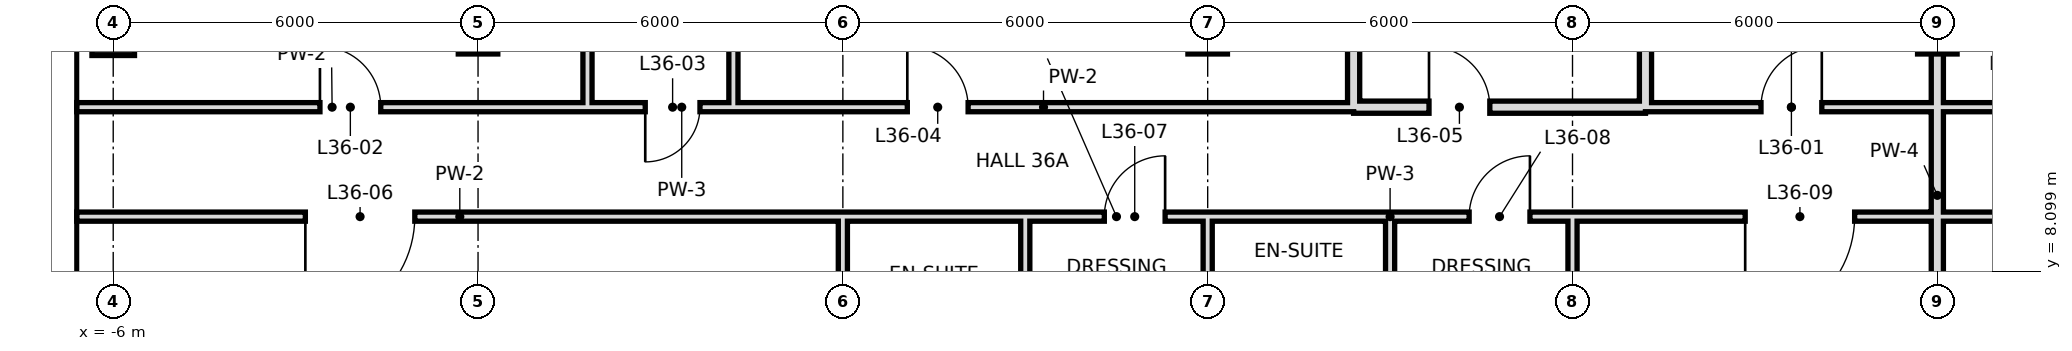
"""IFC4 building model, lengths in metres.
Left out: names, types, materials, properties, quantities, classifications, styles, units other than length and angle.
Written with IfcOpenShell. Run it as: python <this file> out.ifc"""

import sys

from ifc_helpers import new_model, si_unit, direction, frame, frame_2d, origin, origin_2d, place, context, subcontext, project, spatial, rectangle, hollow_rectangle, extrude, element, fill, save


model = new_model("IFC4")
c1 = context("Model", 3, precision=1e-05, world=origin(), true_north=direction((0.0, 1.0)))
c2 = subcontext(c1, "Body", "Model", "MODEL_VIEW")
j1 = project(units=[si_unit("LENGTHUNIT", "METRE"), si_unit("PLANEANGLEUNIT", "RADIAN")], contexts=[c1])
p1 = place(None, origin())
s1 = spatial("IfcSite", under=j1, at=p1, CompositionType="ELEMENT")
p2 = place(p1, origin())
s2 = spatial("IfcBuilding", under=s1, at=p2, CompositionType="ELEMENT")
p3 = place(p2, frame((0.0, 0.0, 158.2)))
s3 = spatial("IfcBuildingStorey", under=s2, at=p3, CompositionType="ELEMENT", Elevation=158.2)
p4 = place(p3, frame((-6.0, 12.0, 0.0), z_axis=(0.0, 0.0, 1.0), x_axis=(1.0, 0.0, 0.0)))
e1 = element("IfcColumn", 1, at=p4, inside=s3, PredefinedType="COLUMN", context=c2, shape_type="SweptSolid", body=[
    extrude(hollow_rectangle(XDim=0.7, YDim=0.7, WallThickness=0.036, at=origin_2d()), origin(), (0.0, 0.0, 1.0), 3.6),
])
for number, where, z_axis, x_axis in (
    (2, (0.0, 12.0, 0.0), (0.0, 0.0, 1.0), (1.0, 0.0, 0.0)),
    (3, (12.0, 12.0, 0.0), (0.0, 0.0, 1.0), (1.0, 0.0, 0.0)),
    (4, (24.0, 12.0, 0.0), (0.0, 0.0, 1.0), (1.0, 0.0, 0.0)),
):
    element("IfcColumn", number, at=place(p3, frame(where, z_axis=z_axis, x_axis=x_axis)), inside=s3, PredefinedType="COLUMN", context=c2, shape_type="SweptSolid", body=[
        extrude(hollow_rectangle(XDim=0.65, YDim=0.65, WallThickness=0.032, at=origin_2d()), origin(), (0.0, 0.0, 1.0), 3.6),
    ])
p5 = place(p3, frame((1.8, 10.8, 0.0), z_axis=(0.0, 0.0, 1.0), x_axis=(0.0, 1.0, 0.0)))
e5 = element("IfcWall", 5, at=p5, inside=s3, PredefinedType="PARTITIONING", context=c2, shape_type="SweptSolid", body=[
    extrude(rectangle(XDim=7.2, YDim=0.15, at=frame_2d((3.6, 0.0))), origin(), (0.0, 0.0, 1.0), 3.38),
])
p6 = place(p3, frame((12.0, 6.0, 0.0), z_axis=(0.0, 0.0, 1.0), x_axis=(0.0, 1.0, 0.0)))
e6 = element("IfcWall", 6, at=p6, inside=s3, PredefinedType="PARTITIONING", context=c2, shape_type="SweptSolid", body=[
    extrude(rectangle(XDim=3.0, YDim=0.15, at=frame_2d((1.5, 0.0))), origin(), (0.0, 0.0, 1.0), 2.68),
])
p7 = place(p3, frame((14.4, 10.8, 0.0), z_axis=(0.0, 0.0, 1.0), x_axis=(0.0, 1.0, 0.0)))
e7 = element("IfcWall", 7, at=p7, inside=s3, PredefinedType="SOLIDWALL", context=c2, shape_type="SweptSolid", body=[
    extrude(rectangle(XDim=7.9, YDim=0.2, at=frame_2d((3.95, 0.0))), origin(), (0.0, 0.0, 1.0), 2.68),
])
p8 = place(p3, frame((15.0, 6.0, 0.0), z_axis=(0.0, 0.0, 1.0), x_axis=(0.0, 1.0, 0.0)))
e8 = element("IfcWall", 8, at=p8, inside=s3, PredefinedType="PARTITIONING", context=c2, shape_type="SweptSolid", body=[
    extrude(rectangle(XDim=3.0, YDim=0.15, at=frame_2d((1.5, 0.0))), origin(), (0.0, 0.0, 1.0), 3.38),
])
p9 = place(p3, frame((18.0, -0.6, 0.0), z_axis=(0.0, 0.0, 1.0), x_axis=(0.0, 1.0, 0.0)))
e9 = element("IfcWall", 9, at=p9, inside=s3, PredefinedType="PARTITIONING", context=c2, shape_type="SweptSolid", body=[
    extrude(rectangle(XDim=9.6, YDim=0.15, at=frame_2d((4.8, 0.0))), origin(), (0.0, 0.0, 1.0), 2.68),
])
p10 = place(p3, frame((19.2, 10.8, 0.0), z_axis=(0.0, 0.0, 1.0), x_axis=(0.0, 1.0, 0.0)))
e10 = element("IfcWall", 10, at=p10, inside=s3, PredefinedType="SOLIDWALL", context=c2, shape_type="SweptSolid", body=[
    extrude(rectangle(XDim=7.9, YDim=0.2, at=frame_2d((3.95, 0.0))), origin(), (0.0, 0.0, 1.0), 2.68),
])
p11 = place(p3, frame((24.0, 0.0, 0.0), z_axis=(0.0, 0.0, 1.0), x_axis=(0.0, 1.0, 0.0)))
e11 = element("IfcWall", 11, at=p11, inside=s3, PredefinedType="SOLIDWALL", context=c2, shape_type="SweptSolid", body=[
    extrude(rectangle(XDim=18.7, YDim=0.2, at=frame_2d((9.35, 0.0))), origin(), (0.0, 0.0, 1.0), 2.68),
])
p12 = place(p3, frame((4.2, 10.8, 0.0), z_axis=(0.0, 0.0, 1.0), x_axis=(0.0, 1.0, 0.0)))
e12 = element("IfcWall", 12, at=p12, inside=s3, PredefinedType="PARTITIONING", context=c2, shape_type="SweptSolid", body=[
    extrude(rectangle(XDim=7.9, YDim=0.15, at=frame_2d((3.95, 0.0))), origin(), (0.0, 0.0, 1.0), 3.38),
])
p13 = place(p3, frame((6.0, 6.0, 0.0), z_axis=(0.0, 0.0, 1.0), x_axis=(0.0, 1.0, 0.0)))
e13 = element("IfcWall", 13, at=p13, inside=s3, PredefinedType="PARTITIONING", context=c2, shape_type="SweptSolid", body=[
    extrude(rectangle(XDim=3.0, YDim=0.15, at=frame_2d((1.5, 0.0))), origin(), (0.0, 0.0, 1.0), 2.68),
])
p14 = place(p3, frame((9.0, 6.0, 0.0), z_axis=(0.0, 0.0, 1.0), x_axis=(0.0, 1.0, 0.0)))
e14 = element("IfcWall", 14, at=p14, inside=s3, PredefinedType="PARTITIONING", context=c2, shape_type="SweptSolid", body=[
    extrude(rectangle(XDim=3.0, YDim=0.15, at=frame_2d((1.5, 0.0))), origin(), (0.0, 0.0, 1.0), 3.38),
])
p15 = place(p3, frame((14.4, 10.8, 0.0), z_axis=(0.0, 0.0, 1.0), x_axis=(1.0, 0.0, 0.0)))
e15 = element("IfcWall", 15, at=p15, inside=s3, PredefinedType="SOLIDWALL", context=c2, shape_type="SweptSolid", body=[
    extrude(rectangle(XDim=4.8, YDim=0.2, at=frame_2d((2.4, 0.0))), origin(), (0.0, 0.0, 1.0), 2.68),
])
p16 = place(p15, frame((1.24, 0.0, 0.0)))
e16 = element("IfcOpeningElement", 16, at=p16, cuts=e15, PredefinedType="OPENING", context=c2, shape_type="SweptSolid", body=[
    extrude(rectangle(XDim=1.0, YDim=2.4, at=frame_2d((0.5, 1.2))), frame((0.0, 0.11, 0.0), z_axis=(0.0, -1.0, 0.0), x_axis=(1.0, 0.0, 0.0)), (0.0, 0.0, 1.0), 0.22),
])
p17 = place(p3, frame((-6.6, 10.8, 0.0), z_axis=(0.0, 0.0, 1.0), x_axis=(1.0, 0.0, 0.0)))
e17 = element("IfcWall", 17, at=p17, inside=s3, PredefinedType="PARTITIONING", context=c2, shape_type="SweptSolid", body=[
    extrude(rectangle(XDim=8.4, YDim=0.15, at=frame_2d((4.2, 0.0))), origin(), (0.0, 0.0, 1.0), 3.38),
])
p18 = place(p17, frame((4.0, 0.0, 0.0)))
e18 = element("IfcOpeningElement", 18, at=p18, cuts=e17, PredefinedType="OPENING", context=c2, shape_type="SweptSolid", body=[
    extrude(rectangle(XDim=1.0, YDim=2.4, at=frame_2d((0.5, 1.2))), frame((0.0, 0.085, 0.0), z_axis=(0.0, -1.0, 0.0), x_axis=(1.0, 0.0, 0.0)), (0.0, 0.0, 1.0), 0.17),
])
p19 = place(p3, frame((4.2, 10.8, 0.0), z_axis=(0.0, 0.0, 1.0), x_axis=(1.0, 0.0, 0.0)))
e19 = element("IfcWall", 19, at=p19, inside=s3, PredefinedType="PARTITIONING", context=c2, shape_type="SweptSolid", body=[
    extrude(rectangle(XDim=10.2, YDim=0.15, at=frame_2d((5.1, 0.0))), origin(), (0.0, 0.0, 1.0), 3.38),
])
p20 = place(p19, frame((2.86, 0.0, 0.0)))
e20 = element("IfcOpeningElement", 20, at=p20, cuts=e19, PredefinedType="OPENING", context=c2, shape_type="SweptSolid", body=[
    extrude(rectangle(XDim=1.0, YDim=2.4, at=frame_2d((0.5, 1.2))), frame((0.0, 0.085, 0.0), z_axis=(0.0, -1.0, 0.0), x_axis=(1.0, 0.0, 0.0)), (0.0, 0.0, 1.0), 0.17),
])
p21 = place(p3, frame((19.2, 10.8, 0.0), z_axis=(0.0, 0.0, 1.0), x_axis=(1.0, 0.0, 0.0)))
e21 = element("IfcWall", 21, at=p21, inside=s3, PredefinedType="PARTITIONING", context=c2, shape_type="SweptSolid", body=[
    extrude(rectangle(XDim=4.8, YDim=0.15, at=frame_2d((2.4, 0.0))), origin(), (0.0, 0.0, 1.0), 3.38),
])
p22 = place(p21, frame((1.9, 0.0, 0.0)))
e22 = element("IfcOpeningElement", 22, at=p22, cuts=e21, PredefinedType="OPENING", context=c2, shape_type="SweptSolid", body=[
    extrude(rectangle(XDim=1.0, YDim=2.4, at=frame_2d((0.5, 1.2))), frame((0.0, 0.085, 0.0), z_axis=(0.0, -1.0, 0.0), x_axis=(1.0, 0.0, 0.0)), (0.0, 0.0, 1.0), 0.17),
])
p23 = place(p3, frame((1.8, 10.8, 0.0), z_axis=(0.0, 0.0, 1.0), x_axis=(1.0, 0.0, 0.0)))
e23 = element("IfcWall", 23, at=p23, inside=s3, PredefinedType="PARTITIONING", context=c2, shape_type="SweptSolid", body=[
    extrude(rectangle(XDim=2.4, YDim=0.15, at=frame_2d((1.2, 0.0))), origin(), (0.0, 0.0, 1.0), 3.38),
])
p24 = place(p23, frame((0.95, 0.0, 0.0)))
e24 = element("IfcOpeningElement", 24, at=p24, cuts=e23, PredefinedType="OPENING", context=c2, shape_type="SweptSolid", body=[
    extrude(rectangle(XDim=0.9, YDim=2.4, at=frame_2d((0.45, 1.2))), frame((0.0, 0.085, 0.0), z_axis=(0.0, -1.0, 0.0), x_axis=(1.0, 0.0, 0.0)), (0.0, 0.0, 1.0), 0.17),
])
p25 = place(p3, frame((24.0, 10.8, 0.0), z_axis=(0.0, 0.0, 1.0), x_axis=(1.0, 0.0, 0.0)))
e25 = element("IfcWall", 25, at=p25, inside=s3, PredefinedType="PARTITIONING", context=c2, shape_type="SweptSolid", body=[
    extrude(rectangle(XDim=2.4, YDim=0.15, at=frame_2d((1.2, 0.0))), origin(), (0.0, 0.0, 1.0), 3.38),
])
p26 = place(p25, frame((0.95, 0.0, 0.0)))
e26 = element("IfcOpeningElement", 26, at=p26, cuts=e25, PredefinedType="OPENING", context=c2, shape_type="SweptSolid", body=[
    extrude(rectangle(XDim=0.9, YDim=2.4, at=frame_2d((0.45, 1.2))), frame((0.0, 0.085, 0.0), z_axis=(0.0, -1.0, 0.0), x_axis=(1.0, 0.0, 0.0)), (0.0, 0.0, 1.0), 0.17),
])
p27 = place(p3, frame((-6.6, 9.0, 0.0), z_axis=(0.0, 0.0, 1.0), x_axis=(1.0, 0.0, 0.0)))
e27 = element("IfcWall", 27, at=p27, inside=s3, PredefinedType="PARTITIONING", context=c2, shape_type="SweptSolid", body=[
    extrude(rectangle(XDim=12.6, YDim=0.15, at=frame_2d((6.3, 0.0))), origin(), (0.0, 0.0, 1.0), 3.38),
])
p28 = place(p27, frame((3.76, 0.0, 0.0)))
e28 = element("IfcOpeningElement", 28, at=p28, cuts=e27, PredefinedType="OPENING", context=c2, shape_type="SweptSolid", body=[
    extrude(rectangle(XDim=1.8, YDim=2.4, at=frame_2d((0.9, 1.2))), frame((0.0, 0.085, 0.0), z_axis=(0.0, -1.0, 0.0), x_axis=(1.0, 0.0, 0.0)), (0.0, 0.0, 1.0), 0.17),
])
p29 = place(p3, frame((9.0, 9.0, 0.0), z_axis=(0.0, 0.0, 1.0), x_axis=(1.0, 0.0, 0.0)))
e29 = element("IfcWall", 29, at=p29, inside=s3, PredefinedType="PARTITIONING", context=c2, shape_type="SweptSolid", body=[
    extrude(rectangle(XDim=3.0, YDim=0.15, at=frame_2d((1.5, 0.0))), origin(), (0.0, 0.0, 1.0), 3.38),
])
p30 = place(p29, frame((1.3, 0.0, 0.0)))
e30 = element("IfcOpeningElement", 30, at=p30, cuts=e29, PredefinedType="OPENING", context=c2, shape_type="SweptSolid", body=[
    extrude(rectangle(XDim=1.0, YDim=2.4, at=frame_2d((0.5, 1.2))), frame((0.0, 0.085, 0.0), z_axis=(0.0, -1.0, 0.0), x_axis=(1.0, 0.0, 0.0)), (0.0, 0.0, 1.0), 0.17),
])
p31 = place(p3, frame((15.0, 9.0, 0.0), z_axis=(0.0, 0.0, 1.0), x_axis=(1.0, 0.0, 0.0)))
e31 = element("IfcWall", 31, at=p31, inside=s3, PredefinedType="PARTITIONING", context=c2, shape_type="SweptSolid", body=[
    extrude(rectangle(XDim=24.6, YDim=0.15, at=frame_2d((12.3, 0.0))), origin(), (0.0, 0.0, 1.0), 3.38),
])
p32 = place(p31, frame((1.3, 0.0, 0.0)))
e32 = element("IfcOpeningElement", 32, at=p32, cuts=e31, PredefinedType="OPENING", context=c2, shape_type="SweptSolid", body=[
    extrude(rectangle(XDim=1.0, YDim=2.4, at=frame_2d((0.5, 1.2))), frame((0.0, 0.085, 0.0), z_axis=(0.0, -1.0, 0.0), x_axis=(1.0, 0.0, 0.0)), (0.0, 0.0, 1.0), 0.17),
])
p33 = place(p31, frame((5.84, 0.0, 0.0)))
e33 = element("IfcOpeningElement", 33, at=p33, cuts=e31, PredefinedType="OPENING", context=c2, shape_type="SweptSolid", body=[
    extrude(rectangle(XDim=1.8, YDim=2.4, at=frame_2d((0.9, 1.2))), frame((0.0, 0.085, 0.0), z_axis=(0.0, -1.0, 0.0), x_axis=(1.0, 0.0, 0.0)), (0.0, 0.0, 1.0), 0.17),
])
p34 = place(p31, frame((10.6, 0.0, 0.0)))
e34 = element("IfcOpeningElement", 34, at=p34, cuts=e31, PredefinedType="OPENING", context=c2, shape_type="SweptSolid", body=[
    extrude(rectangle(XDim=1.0, YDim=2.4, at=frame_2d((0.5, 1.2))), frame((0.0, 0.085, 0.0), z_axis=(0.0, -1.0, 0.0), x_axis=(1.0, 0.0, 0.0)), (0.0, 0.0, 1.0), 0.17),
])
p35 = place(p31, frame((16.6, 0.0, 0.0)))
e35 = element("IfcOpeningElement", 35, at=p35, cuts=e31, PredefinedType="OPENING", context=c2, shape_type="SweptSolid", body=[
    extrude(rectangle(XDim=1.0, YDim=2.4, at=frame_2d((0.5, 1.2))), frame((0.0, 0.085, 0.0), z_axis=(0.0, -1.0, 0.0), x_axis=(1.0, 0.0, 0.0)), (0.0, 0.0, 1.0), 0.17),
])
p36 = place(p31, frame((22.72, 0.0, 0.0)))
e36 = element("IfcOpeningElement", 36, at=p36, cuts=e31, PredefinedType="OPENING", context=c2, shape_type="SweptSolid", body=[
    extrude(rectangle(XDim=1.0, YDim=2.4, at=frame_2d((0.5, 1.2))), frame((0.0, 0.085, 0.0), z_axis=(0.0, -1.0, 0.0), x_axis=(1.0, 0.0, 0.0)), (0.0, 0.0, 1.0), 0.17),
])
for number, where, z_axis, x_axis in (
    (37, (6.0, 9.0, 0.0), (0.0, 0.0, 1.0), (1.0, 0.0, 0.0)),
    (38, (12.0, 9.0, 0.0), (0.0, 0.0, 1.0), (1.0, 0.0, 0.0)),
):
    element("IfcWall", number, at=place(p3, frame(where, z_axis=z_axis, x_axis=x_axis)), inside=s3, PredefinedType="PARTITIONING", context=c2, shape_type="SweptSolid", body=[
        extrude(rectangle(XDim=3.0, YDim=0.15, at=frame_2d((1.5, 0.0))), origin(), (0.0, 0.0, 1.0), 3.38),
    ])
p37 = place(p22, frame((1.0, 0.0, 0.0), z_axis=(0.0, 0.0, 1.0), x_axis=(-1.0, 0.0, 0.0)))
e39 = element("IfcDoor", 39, at=p37, inside=s3, OperationType="SINGLE_SWING_LEFT", PredefinedType="DOOR", context=c2, shape_type="SweptSolid", body=[
    extrude(rectangle(XDim=1.0, YDim=2.4, at=frame_2d((0.5, 1.2))), frame((0.0, 0.025, 0.0), z_axis=(0.0, -1.0, 0.0), x_axis=(1.0, 0.0, 0.0)), (0.0, 0.0, 1.0), 0.05),
])
fill(e22, e39)
p38 = place(p18, origin())
e40 = element("IfcDoor", 40, at=p38, inside=s3, OperationType="SINGLE_SWING_LEFT", PredefinedType="DOOR", context=c2, shape_type="SweptSolid", body=[
    extrude(rectangle(XDim=1.0, YDim=2.4, at=frame_2d((0.5, 1.2))), frame((0.0, 0.025, 0.0), z_axis=(0.0, -1.0, 0.0), x_axis=(1.0, 0.0, 0.0)), (0.0, 0.0, 1.0), 0.05),
])
fill(e18, e40)
p39 = place(p24, frame((0.9, 0.0, 0.0), z_axis=(0.0, 0.0, 1.0), x_axis=(-1.0, 0.0, 0.0)))
e41 = element("IfcDoor", 41, at=p39, inside=s3, OperationType="SINGLE_SWING_RIGHT", PredefinedType="DOOR", context=c2, shape_type="SweptSolid", body=[
    extrude(rectangle(XDim=0.9, YDim=2.4, at=frame_2d((0.45, 1.2))), frame((0.0, 0.025, 0.0), z_axis=(0.0, -1.0, 0.0), x_axis=(1.0, 0.0, 0.0)), (0.0, 0.0, 1.0), 0.05),
])
fill(e24, e41)
p40 = place(p20, origin())
e42 = element("IfcDoor", 42, at=p40, inside=s3, OperationType="SINGLE_SWING_LEFT", PredefinedType="DOOR", context=c2, shape_type="SweptSolid", body=[
    extrude(rectangle(XDim=1.0, YDim=2.4, at=frame_2d((0.5, 1.2))), frame((0.0, 0.025, 0.0), z_axis=(0.0, -1.0, 0.0), x_axis=(1.0, 0.0, 0.0)), (0.0, 0.0, 1.0), 0.05),
])
fill(e20, e42)
p41 = place(p16, origin())
e43 = element("IfcDoor", 43, at=p41, inside=s3, OperationType="SINGLE_SWING_LEFT", PredefinedType="DOOR", context=c2, shape_type="SweptSolid", body=[
    extrude(rectangle(XDim=1.0, YDim=2.4, at=frame_2d((0.5, 1.2))), frame((0.0, 0.025, 0.0), z_axis=(0.0, -1.0, 0.0), x_axis=(1.0, 0.0, 0.0)), (0.0, 0.0, 1.0), 0.05),
])
fill(e16, e43)
p42 = place(p28, frame((1.8, 0.0, 0.0), z_axis=(0.0, 0.0, 1.0), x_axis=(-1.0, 0.0, 0.0)))
e44 = element("IfcDoor", 44, at=p42, inside=s3, OperationType="SINGLE_SWING_RIGHT", PredefinedType="DOOR", context=c2, shape_type="SweptSolid", body=[
    extrude(rectangle(XDim=1.8, YDim=2.4, at=frame_2d((0.9, 1.2))), frame((0.0, 0.025, 0.0), z_axis=(0.0, -1.0, 0.0), x_axis=(1.0, 0.0, 0.0)), (0.0, 0.0, 1.0), 0.05),
])
fill(e28, e44)
p43 = place(p30, frame((1.0, 0.0, 0.0), z_axis=(0.0, 0.0, 1.0), x_axis=(-1.0, 0.0, 0.0)))
e45 = element("IfcDoor", 45, at=p43, inside=s3, OperationType="SINGLE_SWING_LEFT", PredefinedType="DOOR", context=c2, shape_type="SweptSolid", body=[
    extrude(rectangle(XDim=1.0, YDim=2.4, at=frame_2d((0.5, 1.2))), frame((0.0, 0.025, 0.0), z_axis=(0.0, -1.0, 0.0), x_axis=(1.0, 0.0, 0.0)), (0.0, 0.0, 1.0), 0.05),
])
fill(e30, e45)
p44 = place(p32, frame((1.0, 0.0, 0.0), z_axis=(0.0, 0.0, 1.0), x_axis=(-1.0, 0.0, 0.0)))
e46 = element("IfcDoor", 46, at=p44, inside=s3, OperationType="SINGLE_SWING_LEFT", PredefinedType="DOOR", context=c2, shape_type="SweptSolid", body=[
    extrude(rectangle(XDim=1.0, YDim=2.4, at=frame_2d((0.5, 1.2))), frame((0.0, 0.025, 0.0), z_axis=(0.0, -1.0, 0.0), x_axis=(1.0, 0.0, 0.0)), (0.0, 0.0, 1.0), 0.05),
])
fill(e32, e46)
p45 = place(p33, frame((1.8, 0.0, 0.0), z_axis=(0.0, 0.0, 1.0), x_axis=(-1.0, 0.0, 0.0)))
e47 = element("IfcDoor", 47, at=p45, inside=s3, OperationType="SINGLE_SWING_RIGHT", PredefinedType="DOOR", context=c2, shape_type="SweptSolid", body=[
    extrude(rectangle(XDim=1.8, YDim=2.4, at=frame_2d((0.9, 1.2))), frame((0.0, 0.025, 0.0), z_axis=(0.0, -1.0, 0.0), x_axis=(1.0, 0.0, 0.0)), (0.0, 0.0, 1.0), 0.05),
])
fill(e33, e47)
save(model, sys.argv[1])
